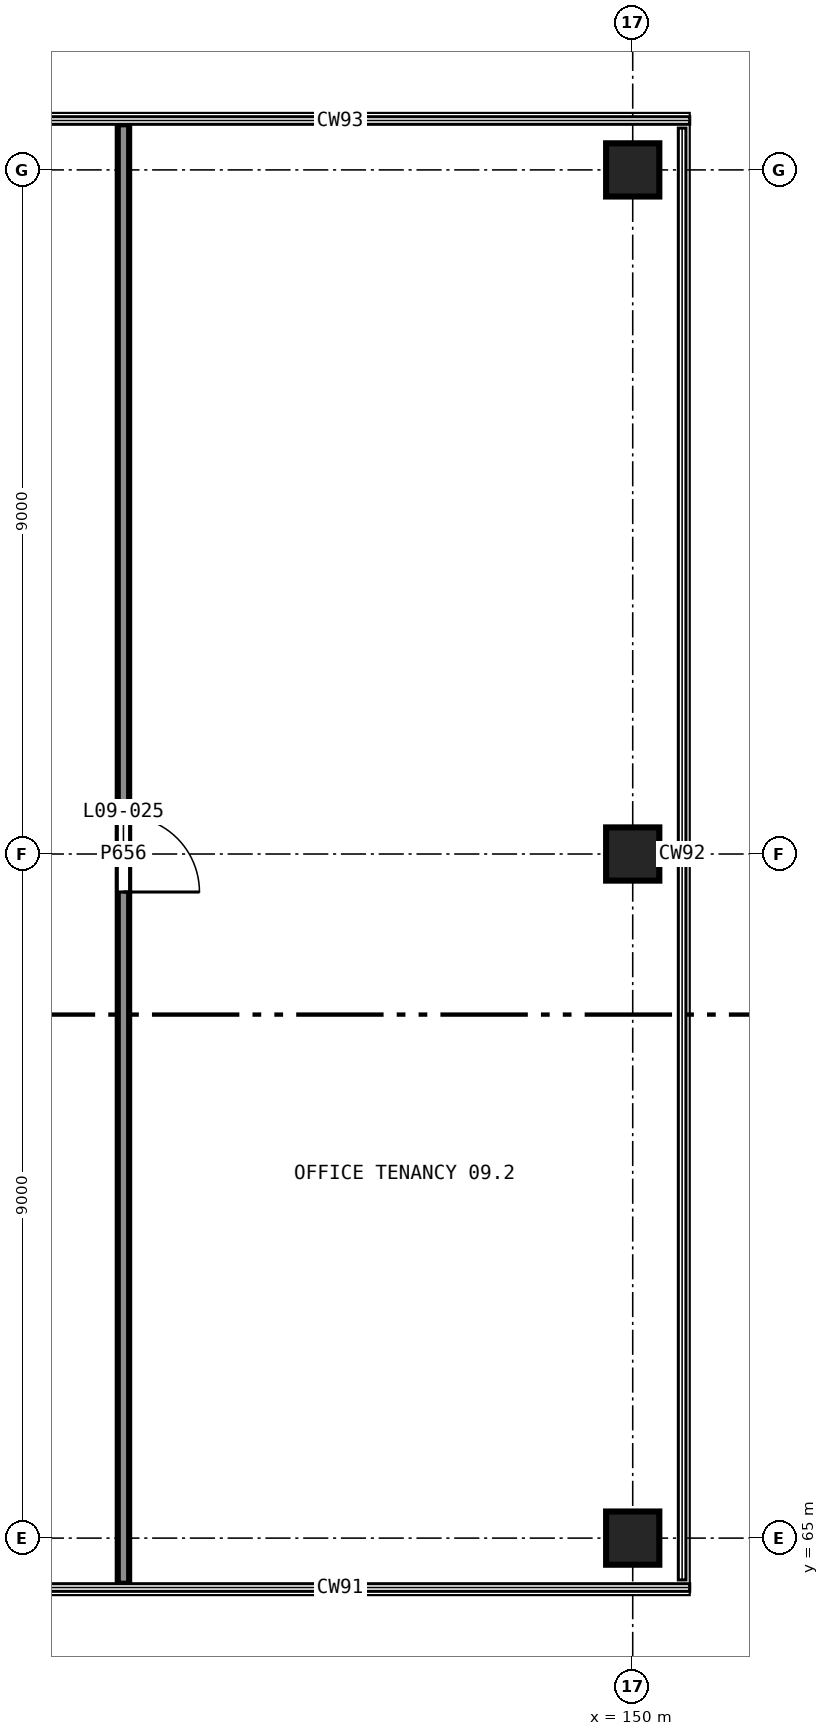
"""IFC4 building model, lengths in metres.
Left out: names, types, materials, properties, quantities, classifications, styles, units other than length and angle.
Written with IfcOpenShell. Run it as: python <this file> out.ifc"""

import sys

from ifc_helpers import new_model, si_unit, direction, frame, frame_2d, origin, origin_2d, place, context, subcontext, project, spatial, rectangle, extrude, element, fill, save


model = new_model("IFC4")
c1 = context("Model", 3, precision=1e-05, world=origin(), true_north=direction((0.0, 1.0)))
c2 = subcontext(c1, "Body", "Model", "MODEL_VIEW")
j1 = project(units=[si_unit("LENGTHUNIT", "METRE"), si_unit("PLANEANGLEUNIT", "RADIAN")], contexts=[c1])
p1 = place(None, origin())
s1 = spatial("IfcSite", under=j1, at=p1, CompositionType="ELEMENT")
p2 = place(p1, origin())
s2 = spatial("IfcBuilding", under=s1, at=p2, CompositionType="ELEMENT")
p3 = place(p2, frame((0.0, 0.0, 37.5)))
s3 = spatial("IfcBuildingStorey", under=s2, at=p3, CompositionType="ELEMENT", Elevation=37.5)
for number, where, z_axis, x_axis in (
    (1, (150.0, 65.0, 0.0), (0.0, 0.0, 1.0), (1.0, 0.0, 0.0)),
    (2, (150.0, 74.0, 0.0), (0.0, 0.0, 1.0), (1.0, 0.0, 0.0)),
    (3, (150.0, 83.0, 0.0), (0.0, 0.0, 1.0), (1.0, 0.0, 0.0)),
):
    element("IfcColumn", number, at=place(p3, frame(where, z_axis=z_axis, x_axis=x_axis)), inside=s3, PredefinedType="COLUMN", context=c2, shape_type="SweptSolid", body=[
        extrude(rectangle(XDim=0.7, YDim=0.7, at=origin_2d()), origin(), (0.0, 0.0, 1.0), 4.0),
    ])
p4 = place(p3, frame((143.3, 83.6, 0.0), z_axis=(0.0, 0.0, 1.0), x_axis=(0.0, -1.0, 0.0)))
e4 = element("IfcWall", 4, at=p4, inside=s3, PredefinedType="PARTITIONING", context=c2, shape_type="SweptSolid", body=[
    extrude(rectangle(XDim=19.2, YDim=0.15, at=frame_2d((9.6, 0.0))), origin(), (0.0, 0.0, 1.0), 3.58),
])
p5 = place(p4, frame((9.1, 0.0, 0.0)))
e5 = element("IfcOpeningElement", 5, at=p5, cuts=e4, PredefinedType="OPENING", context=c2, shape_type="SweptSolid", body=[
    extrude(rectangle(XDim=1.0, YDim=2.1, at=frame_2d((0.5, 1.05))), frame((0.0, 0.085, 0.0), z_axis=(0.0, -1.0, 0.0), x_axis=(1.0, 0.0, 0.0)), (0.0, 0.0, 1.0), 0.17),
])
p6 = place(p5, origin())
e6 = element("IfcDoor", 6, at=p6, inside=s3, OperationType="SINGLE_SWING_LEFT", PredefinedType="DOOR", context=c2, shape_type="SweptSolid", body=[
    extrude(rectangle(XDim=1.0, YDim=2.1, at=frame_2d((0.5, 1.05))), frame((0.0, 0.025, 0.0), z_axis=(0.0, -1.0, 0.0), x_axis=(1.0, 0.0, 0.0)), (0.0, 0.0, 1.0), 0.05),
])
fill(e5, e6)
save(model, sys.argv[1])
